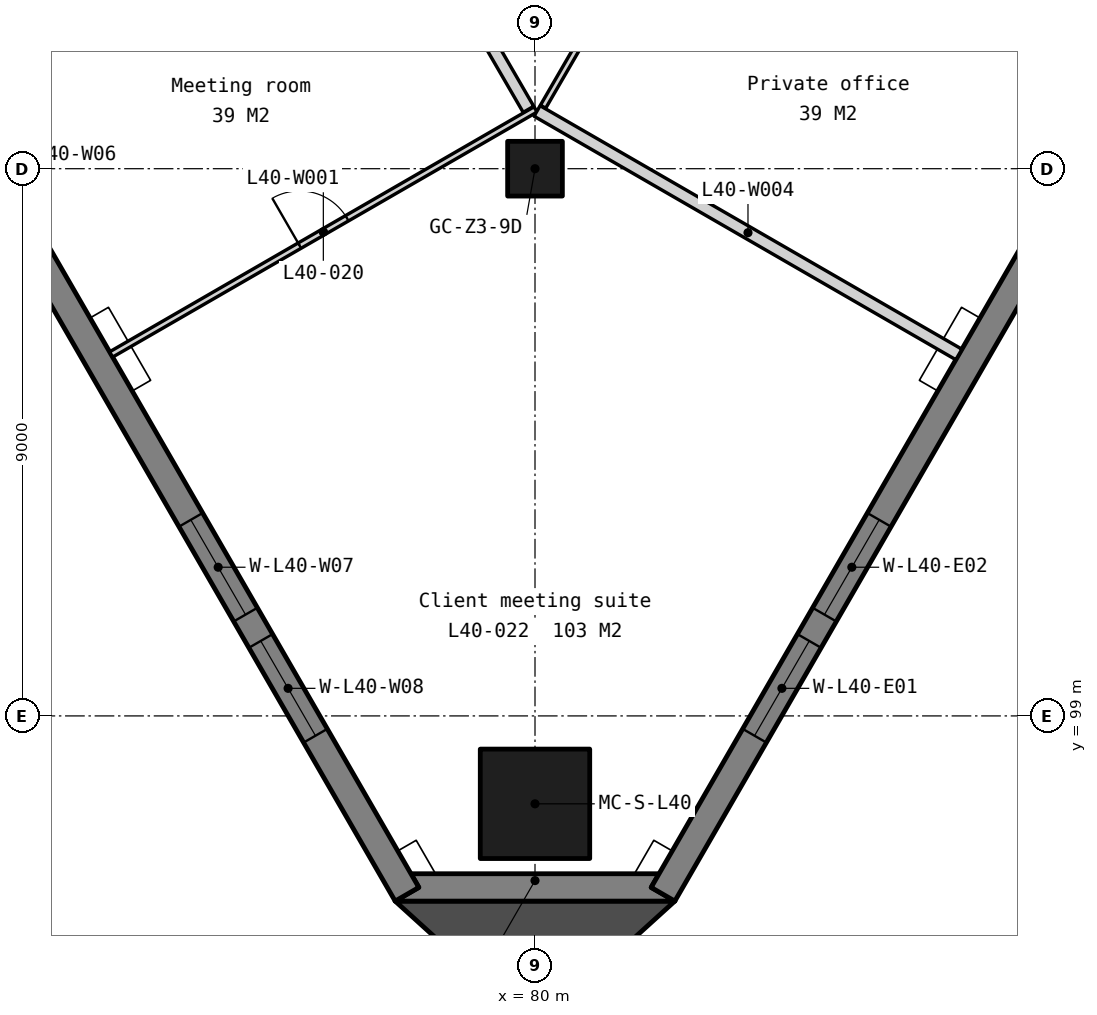
"""IFC4 building model, lengths in metres.
Left out: names, types, materials, properties, quantities, classifications, styles, units other than length and angle.
Written with IfcOpenShell. Run it as: python <this file> out.ifc"""

import sys

from ifc_helpers import new_model, si_unit, direction, frame, frame_2d, origin, origin_2d, place, context, subcontext, project, spatial, polyline, rectangle, outline, extrude, element, fill, save


model = new_model("IFC4")
c1 = context("Model", 3, precision=1e-05, world=origin(), true_north=direction((0.0, 1.0)))
c2 = subcontext(c1, "Body", "Model", "MODEL_VIEW")
j1 = project(units=[si_unit("LENGTHUNIT", "METRE"), si_unit("PLANEANGLEUNIT", "RADIAN")], contexts=[c1])
p1 = place(None, origin())
s1 = spatial("IfcSite", under=j1, at=p1, CompositionType="ELEMENT")
p2 = place(p1, origin())
s2 = spatial("IfcBuilding", under=s1, at=p2, CompositionType="ELEMENT")
p3 = place(p2, frame((0.0, 0.0, 159.8)))
s3 = spatial("IfcBuildingStorey", under=s2, at=p3, CompositionType="ELEMENT", Elevation=159.8)
p4 = place(p3, frame((80.0, 108.0, 0.0), z_axis=(0.0, 0.0, 1.0), x_axis=(1.0, 0.0, 0.0)))
e1 = element("IfcColumn", 1, at=p4, inside=s3, PredefinedType="COLUMN", context=c2, shape_type="SweptSolid", body=[
    extrude(rectangle(XDim=0.9, YDim=0.9, at=origin_2d()), origin(), (0.0, 0.0, 1.0), 3.9),
])
p5 = place(p3, frame((80.0, 97.554, 0.0), z_axis=(0.0, 0.0, 1.0), x_axis=(1.0, 0.0, 0.0)))
e2 = element("IfcColumn", 2, at=p5, inside=s3, PredefinedType="COLUMN", context=c2, shape_type="SweptSolid", body=[
    extrude(rectangle(XDim=1.8, YDim=1.8, at=origin_2d()), origin(), (0.0, 0.0, 1.0), 3.9),
])
p6 = place(p3, frame((0.0, 0.0, -0.15)))
e3 = element("IfcWall", 3, at=p6, inside=s3, PredefinedType="SOLIDWALL", context=c2, shape_type="SweptSolid", body=[
    extrude(outline(polyline([(77.7, 95.954), (78.09, 96.179), (77.96, 96.404), (82.04, 96.404), (81.91, 96.179), (82.3, 95.954), (77.7, 95.954)])), origin(), (0.0, 0.0, 1.0), 3.9),
])
p7 = place(p3, frame((57.652, 131.129, -0.15), z_axis=(0.0, 0.0, 1.0), x_axis=(0.499997369791, -0.866026922331, 0.0)))
e4 = element("IfcWall", 4, at=p7, inside=s3, PredefinedType="SOLIDWALL", context=c2, shape_type="SweptSolid", body=[
    extrude(outline(polyline([(40.486, 0.0), (40.486, 3.9), (0.0, 3.9), (0.0, 0.0), (40.486, 0.0)])), frame((0.0, 0.225, 0.0), z_axis=(0.0, -1.0, 0.0), x_axis=(1.0, 0.0, 0.0)), (0.0, 0.0, 1.0), 0.45),
])
p8 = place(p7, frame((3.011, 0.0, 0.95)))
e5 = element("IfcOpeningElement", 5, at=p8, cuts=e4, PredefinedType="OPENING", context=c2, shape_type="SweptSolid", body=[
    extrude(rectangle(XDim=1.8, YDim=2.2, at=frame_2d((0.9, 1.1))), frame((0.0, 0.235, 0.0), z_axis=(0.0, -1.0, 0.0), x_axis=(1.0, 0.0, 0.0)), (0.0, 0.0, 1.0), 0.47),
])
p9 = place(p7, frame((5.311, 0.0, 0.95)))
e6 = element("IfcOpeningElement", 6, at=p9, cuts=e4, PredefinedType="OPENING", context=c2, shape_type="SweptSolid", body=[
    extrude(rectangle(XDim=1.8, YDim=2.2, at=frame_2d((0.9, 1.1))), frame((0.0, 0.235, 0.0), z_axis=(0.0, -1.0, 0.0), x_axis=(1.0, 0.0, 0.0)), (0.0, 0.0, 1.0), 0.47),
])
p10 = place(p7, frame((13.132, 0.0, 0.95)))
e7 = element("IfcOpeningElement", 7, at=p10, cuts=e4, PredefinedType="OPENING", context=c2, shape_type="SweptSolid", body=[
    extrude(rectangle(XDim=1.8, YDim=2.2, at=frame_2d((0.9, 1.1))), frame((0.0, 0.235, 0.0), z_axis=(0.0, -1.0, 0.0), x_axis=(1.0, 0.0, 0.0)), (0.0, 0.0, 1.0), 0.47),
])
p11 = place(p7, frame((15.432, 0.0, 0.95)))
e8 = element("IfcOpeningElement", 8, at=p11, cuts=e4, PredefinedType="OPENING", context=c2, shape_type="SweptSolid", body=[
    extrude(rectangle(XDim=1.8, YDim=2.2, at=frame_2d((0.9, 1.1))), frame((0.0, 0.235, 0.0), z_axis=(0.0, -1.0, 0.0), x_axis=(1.0, 0.0, 0.0)), (0.0, 0.0, 1.0), 0.47),
])
p12 = place(p7, frame((23.254, 0.0, 0.95)))
e9 = element("IfcOpeningElement", 9, at=p12, cuts=e4, PredefinedType="OPENING", context=c2, shape_type="SweptSolid", body=[
    extrude(rectangle(XDim=1.8, YDim=2.2, at=frame_2d((0.9, 1.1))), frame((0.0, 0.235, 0.0), z_axis=(0.0, -1.0, 0.0), x_axis=(1.0, 0.0, 0.0)), (0.0, 0.0, 1.0), 0.47),
])
p13 = place(p7, frame((25.554, 0.0, 0.95)))
e10 = element("IfcOpeningElement", 10, at=p13, cuts=e4, PredefinedType="OPENING", context=c2, shape_type="SweptSolid", body=[
    extrude(rectangle(XDim=1.8, YDim=2.2, at=frame_2d((0.9, 1.1))), frame((0.0, 0.235, 0.0), z_axis=(0.0, -1.0, 0.0), x_axis=(1.0, 0.0, 0.0)), (0.0, 0.0, 1.0), 0.47),
])
p14 = place(p7, frame((33.375, 0.0, 0.95)))
e11 = element("IfcOpeningElement", 11, at=p14, cuts=e4, PredefinedType="OPENING", context=c2, shape_type="SweptSolid", body=[
    extrude(rectangle(XDim=1.8, YDim=2.2, at=frame_2d((0.9, 1.1))), frame((0.0, 0.235, 0.0), z_axis=(0.0, -1.0, 0.0), x_axis=(1.0, 0.0, 0.0)), (0.0, 0.0, 1.0), 0.47),
])
p15 = place(p7, frame((35.675, 0.0, 0.95)))
e12 = element("IfcOpeningElement", 12, at=p15, cuts=e4, PredefinedType="OPENING", context=c2, shape_type="SweptSolid", body=[
    extrude(rectangle(XDim=1.8, YDim=2.2, at=frame_2d((0.9, 1.1))), frame((0.0, 0.235, 0.0), z_axis=(0.0, -1.0, 0.0), x_axis=(1.0, 0.0, 0.0)), (0.0, 0.0, 1.0), 0.47),
])
p16 = place(p3, frame((82.105, 96.067, -0.15), z_axis=(0.0, 0.0, 1.0), x_axis=(0.499997369791, 0.866026922331, 0.0)))
e13 = element("IfcWall", 13, at=p16, inside=s3, PredefinedType="SOLIDWALL", context=c2, shape_type="SweptSolid", body=[
    extrude(outline(polyline([(40.486, 0.0), (40.486, 3.9), (0.0, 3.9), (0.0, 0.0), (40.486, 0.0)])), frame((0.0, 0.225, 0.0), z_axis=(0.0, -1.0, 0.0), x_axis=(1.0, 0.0, 0.0)), (0.0, 0.0, 1.0), 0.45),
])
p17 = place(p16, frame((3.011, 0.0, 0.95)))
e14 = element("IfcOpeningElement", 14, at=p17, cuts=e13, PredefinedType="OPENING", context=c2, shape_type="SweptSolid", body=[
    extrude(rectangle(XDim=1.8, YDim=2.2, at=frame_2d((0.9, 1.1))), frame((0.0, 0.235, 0.0), z_axis=(0.0, -1.0, 0.0), x_axis=(1.0, 0.0, 0.0)), (0.0, 0.0, 1.0), 0.47),
])
p18 = place(p16, frame((5.311, 0.0, 0.95)))
e15 = element("IfcOpeningElement", 15, at=p18, cuts=e13, PredefinedType="OPENING", context=c2, shape_type="SweptSolid", body=[
    extrude(rectangle(XDim=1.8, YDim=2.2, at=frame_2d((0.9, 1.1))), frame((0.0, 0.235, 0.0), z_axis=(0.0, -1.0, 0.0), x_axis=(1.0, 0.0, 0.0)), (0.0, 0.0, 1.0), 0.47),
])
p19 = place(p16, frame((13.132, 0.0, 0.95)))
e16 = element("IfcOpeningElement", 16, at=p19, cuts=e13, PredefinedType="OPENING", context=c2, shape_type="SweptSolid", body=[
    extrude(rectangle(XDim=1.8, YDim=2.2, at=frame_2d((0.9, 1.1))), frame((0.0, 0.235, 0.0), z_axis=(0.0, -1.0, 0.0), x_axis=(1.0, 0.0, 0.0)), (0.0, 0.0, 1.0), 0.47),
])
p20 = place(p16, frame((15.432, 0.0, 0.95)))
e17 = element("IfcOpeningElement", 17, at=p20, cuts=e13, PredefinedType="OPENING", context=c2, shape_type="SweptSolid", body=[
    extrude(rectangle(XDim=1.8, YDim=2.2, at=frame_2d((0.9, 1.1))), frame((0.0, 0.235, 0.0), z_axis=(0.0, -1.0, 0.0), x_axis=(1.0, 0.0, 0.0)), (0.0, 0.0, 1.0), 0.47),
])
p21 = place(p16, frame((23.254, 0.0, 0.95)))
e18 = element("IfcOpeningElement", 18, at=p21, cuts=e13, PredefinedType="OPENING", context=c2, shape_type="SweptSolid", body=[
    extrude(rectangle(XDim=1.8, YDim=2.2, at=frame_2d((0.9, 1.1))), frame((0.0, 0.235, 0.0), z_axis=(0.0, -1.0, 0.0), x_axis=(1.0, 0.0, 0.0)), (0.0, 0.0, 1.0), 0.47),
])
p22 = place(p16, frame((25.554, 0.0, 0.95)))
e19 = element("IfcOpeningElement", 19, at=p22, cuts=e13, PredefinedType="OPENING", context=c2, shape_type="SweptSolid", body=[
    extrude(rectangle(XDim=1.8, YDim=2.2, at=frame_2d((0.9, 1.1))), frame((0.0, 0.235, 0.0), z_axis=(0.0, -1.0, 0.0), x_axis=(1.0, 0.0, 0.0)), (0.0, 0.0, 1.0), 0.47),
])
p23 = place(p16, frame((33.375, 0.0, 0.95)))
e20 = element("IfcOpeningElement", 20, at=p23, cuts=e13, PredefinedType="OPENING", context=c2, shape_type="SweptSolid", body=[
    extrude(rectangle(XDim=1.8, YDim=2.2, at=frame_2d((0.9, 1.1))), frame((0.0, 0.235, 0.0), z_axis=(0.0, -1.0, 0.0), x_axis=(1.0, 0.0, 0.0)), (0.0, 0.0, 1.0), 0.47),
])
p24 = place(p16, frame((35.675, 0.0, 0.95)))
e21 = element("IfcOpeningElement", 21, at=p24, cuts=e13, PredefinedType="OPENING", context=c2, shape_type="SweptSolid", body=[
    extrude(rectangle(XDim=1.8, YDim=2.2, at=frame_2d((0.9, 1.1))), frame((0.0, 0.235, 0.0), z_axis=(0.0, -1.0, 0.0), x_axis=(1.0, 0.0, 0.0)), (0.0, 0.0, 1.0), 0.47),
])
p25 = place(p3, frame((0.0, 0.0, -0.15)))
e22 = element("IfcWall", 22, at=p25, inside=s3, PredefinedType="SOLIDWALL", context=c2, shape_type="SweptSolid", body=[
    extrude(outline(polyline([(77.7, 95.954), (80.0, 93.868), (82.3, 95.954), (77.7, 95.954)])), origin(), (0.0, 0.0, 1.0), 3.9),
])
p26 = place(p3, frame((73.029, 104.945, 0.0), z_axis=(0.0, 0.0, 1.0), x_axis=(0.866018113567, 0.500012626815, 0.0)))
e23 = element("IfcWall", 23, at=p26, inside=s3, PredefinedType="PARTITIONING", context=c2, shape_type="SweptSolid", body=[
    extrude(rectangle(XDim=8.06, YDim=0.1, at=frame_2d((4.03, 0.0))), origin(), (0.0, 0.0, 1.0), 3.75),
])
p27 = place(p26, frame((3.58, 0.0, 0.0)))
e24 = element("IfcOpeningElement", 24, at=p27, cuts=e23, PredefinedType="OPENING", context=c2, shape_type="SweptSolid", body=[
    extrude(rectangle(XDim=0.9, YDim=2.1, at=frame_2d((0.45, 1.05))), frame((0.0, 0.06, 0.0), z_axis=(0.0, -1.0, 0.0), x_axis=(1.0, 0.0, 0.0)), (0.0, 0.0, 1.0), 0.12),
])
p28 = place(p3, frame((77.384, 113.302, 0.0), z_axis=(0.0, 0.0, 1.0), x_axis=(0.501680827225, -0.865052800467, 0.0)))
e25 = element("IfcWall", 25, at=p28, inside=s3, PredefinedType="PARTITIONING", context=c2, shape_type="SweptSolid", body=[
    extrude(rectangle(XDim=5.001, YDim=0.2, at=frame_2d((2.5, 0.0))), origin(), (0.0, 0.0, 1.0), 3.75),
])
p29 = place(p3, frame((80.034, 108.95, 0.0), z_axis=(0.0, 0.0, 1.0), x_axis=(0.866028745538, -0.499994211868, 0.0)))
e26 = element("IfcWall", 26, at=p29, inside=s3, PredefinedType="PARTITIONING", context=c2, shape_type="SweptSolid", body=[
    extrude(rectangle(XDim=8.01, YDim=0.2, at=frame_2d((4.005, 0.0))), origin(), (0.0, 0.0, 1.0), 3.75),
])
p30 = place(p3, frame((70.499, 109.327, 0.0), z_axis=(0.0, 0.0, 1.0), x_axis=(0.86602399778, 0.500002435262, 0.0)))
e27 = element("IfcWall", 27, at=p30, inside=s3, PredefinedType="PARTITIONING", context=c2, shape_type="SweptSolid", body=[
    extrude(rectangle(XDim=7.85, YDim=0.1, at=frame_2d((3.925, 0.0))), origin(), (0.0, 0.0, 1.0), 3.75),
])
p31 = place(p30, frame((3.475, 0.0, 0.0)))
e28 = element("IfcOpeningElement", 28, at=p31, cuts=e27, PredefinedType="OPENING", context=c2, shape_type="SweptSolid", body=[
    extrude(rectangle(XDim=0.9, YDim=2.1, at=frame_2d((0.45, 1.05))), frame((0.0, 0.06, 0.0), z_axis=(0.0, -1.0, 0.0), x_axis=(1.0, 0.0, 0.0)), (0.0, 0.0, 1.0), 0.12),
])
p32 = place(p3, frame((82.66, 113.278, 0.0), z_axis=(0.0, 0.0, 1.0), x_axis=(0.866013180616, -0.500021170551, 0.0)))
e29 = element("IfcWall", 29, at=p32, inside=s3, PredefinedType="PARTITIONING", context=c2, shape_type="SweptSolid", body=[
    extrude(rectangle(XDim=7.9, YDim=0.1, at=frame_2d((3.95, 0.0))), origin(), (0.0, 0.0, 1.0), 3.75),
])
p33 = place(p32, frame((3.5, 0.0, 0.0)))
e30 = element("IfcOpeningElement", 30, at=p33, cuts=e29, PredefinedType="OPENING", context=c2, shape_type="SweptSolid", body=[
    extrude(rectangle(XDim=0.9, YDim=2.1, at=frame_2d((0.45, 1.05))), frame((0.0, 0.06, 0.0), z_axis=(0.0, -1.0, 0.0), x_axis=(1.0, 0.0, 0.0)), (0.0, 0.0, 1.0), 0.12),
])
p34 = place(p3, frame((80.133, 109.02, 0.0), z_axis=(0.0, 0.0, 1.0), x_axis=(0.501726207978, 0.865026480651, 0.0)))
e31 = element("IfcWall", 31, at=p34, inside=s3, PredefinedType="PARTITIONING", context=c2, shape_type="SweptSolid", body=[
    extrude(rectangle(XDim=4.951, YDim=0.1, at=frame_2d((2.475, 0.0))), origin(), (0.0, 0.0, 1.0), 3.75),
])
p35 = place(p34, frame((2.025, 0.0, 0.0)))
e32 = element("IfcOpeningElement", 32, at=p35, cuts=e31, PredefinedType="OPENING", context=c2, shape_type="SweptSolid", body=[
    extrude(rectangle(XDim=0.9, YDim=2.1, at=frame_2d((0.45, 1.05))), frame((0.0, 0.06, 0.0), z_axis=(0.0, -1.0, 0.0), x_axis=(1.0, 0.0, 0.0)), (0.0, 0.0, 1.0), 0.12),
])
p36 = place(p14, origin())
e33 = element("IfcWindow", 33, at=p36, inside=s3, PartitioningType="SINGLE_PANEL", PredefinedType="WINDOW", context=c2, shape_type="SweptSolid", body=[
    extrude(rectangle(XDim=1.8, YDim=2.2, at=frame_2d((0.9, 1.1))), frame((0.0, 0.03, 0.0), z_axis=(0.0, -1.0, 0.0), x_axis=(1.0, 0.0, 0.0)), (0.0, 0.0, 1.0), 0.06),
])
fill(e11, e33)
p37 = place(p15, origin())
e34 = element("IfcWindow", 34, at=p37, inside=s3, PartitioningType="SINGLE_PANEL", PredefinedType="WINDOW", context=c2, shape_type="SweptSolid", body=[
    extrude(rectangle(XDim=1.8, YDim=2.2, at=frame_2d((0.9, 1.1))), frame((0.0, 0.03, 0.0), z_axis=(0.0, -1.0, 0.0), x_axis=(1.0, 0.0, 0.0)), (0.0, 0.0, 1.0), 0.06),
])
fill(e12, e34)
p38 = place(p17, origin())
e35 = element("IfcWindow", 35, at=p38, inside=s3, PartitioningType="SINGLE_PANEL", PredefinedType="WINDOW", context=c2, shape_type="SweptSolid", body=[
    extrude(rectangle(XDim=1.8, YDim=2.2, at=frame_2d((0.9, 1.1))), frame((0.0, 0.03, 0.0), z_axis=(0.0, -1.0, 0.0), x_axis=(1.0, 0.0, 0.0)), (0.0, 0.0, 1.0), 0.06),
])
fill(e14, e35)
p39 = place(p18, origin())
e36 = element("IfcWindow", 36, at=p39, inside=s3, PartitioningType="SINGLE_PANEL", PredefinedType="WINDOW", context=c2, shape_type="SweptSolid", body=[
    extrude(rectangle(XDim=1.8, YDim=2.2, at=frame_2d((0.9, 1.1))), frame((0.0, 0.03, 0.0), z_axis=(0.0, -1.0, 0.0), x_axis=(1.0, 0.0, 0.0)), (0.0, 0.0, 1.0), 0.06),
])
fill(e15, e36)
p40 = place(p27, origin())
e37 = element("IfcDoor", 37, at=p40, inside=s3, OperationType="SINGLE_SWING_LEFT", PredefinedType="DOOR", context=c2, shape_type="SweptSolid", body=[
    extrude(rectangle(XDim=0.9, YDim=2.1, at=frame_2d((0.45, 1.05))), frame((0.0, 0.025, 0.0), z_axis=(0.0, -1.0, 0.0), x_axis=(1.0, 0.0, 0.0)), (0.0, 0.0, 1.0), 0.05),
])
fill(e24, e37)
save(model, sys.argv[1])
